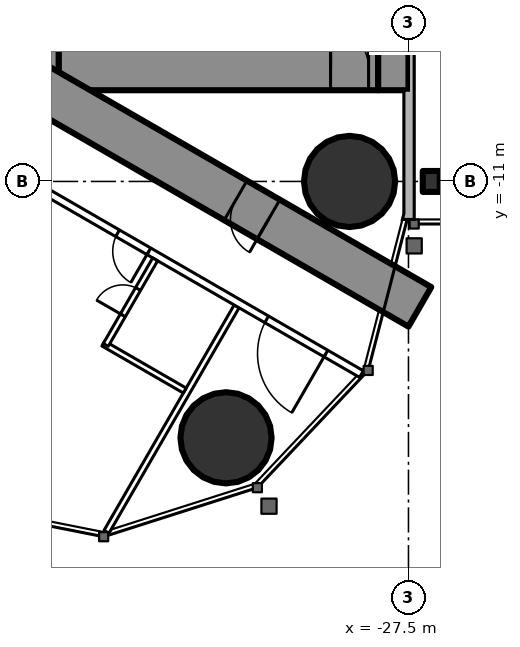
"""IFC4 building model, lengths in metres.
Left out: names, types, materials, properties, quantities, classifications, styles, units other than length and angle.
Written with IfcOpenShell. Run it as: python <this file> out.ifc"""

import sys

from ifc_helpers import new_model, si_unit, direction, frame, frame_2d, origin, origin_2d, place, context, subcontext, project, spatial, rectangle, circle, i_section, extrude, element, fill, save


model = new_model("IFC4")
c1 = context("Model", 3, precision=1e-05, world=origin(), true_north=direction((0.0, 1.0)))
c2 = subcontext(c1, "Body", "Model", "MODEL_VIEW")
j1 = project(units=[si_unit("LENGTHUNIT", "METRE"), si_unit("PLANEANGLEUNIT", "RADIAN")], contexts=[c1])
p1 = place(None, origin())
s1 = spatial("IfcSite", under=j1, at=p1, CompositionType="ELEMENT")
p2 = place(p1, origin())
s2 = spatial("IfcBuilding", under=s1, at=p2, CompositionType="ELEMENT")
p3 = place(p2, frame((0.0, 0.0, 236.9)))
s3 = spatial("IfcBuildingStorey", under=s2, at=p3, CompositionType="ELEMENT", Elevation=236.9)
for number, where, z_axis, x_axis in (
    (1, (-32.301, -17.745, 0.0), (0.0, 0.0, 1.0), (1.0, 0.0, 0.0)),
    (2, (-29.05, -11.0, 0.0), (0.0, 0.0, 1.0), (1.0, 0.0, 0.0)),
):
    element("IfcColumn", number, at=place(p3, frame(where, z_axis=z_axis, x_axis=x_axis)), inside=s3, PredefinedType="COLUMN", context=c2, shape_type="SweptSolid", body=[
        extrude(circle(Radius=1.2, at=origin_2d()), origin(), (0.0, 0.0, 1.0), 3.6),
    ])
p4 = place(p3, frame((-27.9, 8.6, 0.0), z_axis=(0.0, 0.0, 1.0), x_axis=(0.0, -1.0, 0.0)))
e3 = element("IfcWall", 3, at=p4, inside=s3, PredefinedType="SHEAR", context=c2, shape_type="SweptSolid", body=[
    extrude(rectangle(XDim=17.2, YDim=0.8, at=frame_2d((8.6, 0.0))), origin(), (0.0, 0.0, 1.0), 3.6),
])
p5 = place(p4, frame((6.95, 0.0, 0.0)))
e4 = element("IfcOpeningElement", 4, at=p5, cuts=e3, PredefinedType="OPENING", context=c2, shape_type="SweptSolid", body=[
    extrude(rectangle(XDim=0.9, YDim=2.2, at=frame_2d((0.45, 1.1))), frame((0.0, 0.41, 0.0), z_axis=(0.0, -1.0, 0.0), x_axis=(1.0, 0.0, 0.0)), (0.0, 0.0, 1.0), 0.82),
])
p6 = place(p3, frame((-37.3, 8.6, 0.0), z_axis=(0.0, 0.0, 1.0), x_axis=(0.0, -1.0, 0.0)))
e5 = element("IfcWall", 5, at=p6, inside=s3, PredefinedType="SHEAR", context=c2, shape_type="SweptSolid", body=[
    extrude(rectangle(XDim=17.2, YDim=1.2, at=frame_2d((8.6, 0.0))), origin(), (0.0, 0.0, 1.0), 3.6),
])
p7 = place(p6, frame((7.7, 0.0, 0.0)))
e6 = element("IfcOpeningElement", 6, at=p7, cuts=e5, PredefinedType="OPENING", context=c2, shape_type="SweptSolid", body=[
    extrude(rectangle(XDim=1.8, YDim=2.2, at=frame_2d((0.9, 1.1))), frame((0.0, 0.61, 0.0), z_axis=(0.0, -1.0, 0.0), x_axis=(1.0, 0.0, 0.0)), (0.0, 0.0, 1.0), 1.22),
])
p8 = place(p3, frame((-28.3, -8.0, 0.0), z_axis=(0.0, 0.0, 1.0), x_axis=(-1.0, 0.0, 0.0)))
e7 = element("IfcWall", 7, at=p8, inside=s3, PredefinedType="SHEAR", context=c2, shape_type="SweptSolid", body=[
    extrude(rectangle(XDim=8.4, YDim=1.2, at=frame_2d((4.2, 0.0))), origin(), (0.0, 0.0, 1.0), 3.6),
])
p9 = place(p8, frame((0.25, 0.0, 0.0)))
e8 = element("IfcOpeningElement", 8, at=p9, cuts=e7, PredefinedType="OPENING", context=c2, shape_type="SweptSolid", body=[
    extrude(rectangle(XDim=1.0, YDim=2.2, at=frame_2d((0.5, 1.1))), frame((0.0, 0.61, 0.0), z_axis=(0.0, -1.0, 0.0), x_axis=(1.0, 0.0, 0.0)), (0.0, 0.0, 1.0), 1.22),
])
p10 = place(p3, frame((-27.2, -14.3, 0.0), z_axis=(0.0, 0.0, 1.0), x_axis=(-0.866024021859, 0.500002393557, 0.0)))
e9 = element("IfcWall", 9, at=p10, inside=s3, PredefinedType="SHEAR", context=c2, shape_type="SweptSolid", body=[
    extrude(rectangle(XDim=27.907, YDim=1.2, at=frame_2d((13.954, 0.0))), origin(), (0.0, 0.0, 1.0), 3.6),
])
p11 = place(p10, frame((4.6, 0.0, 0.0)))
e10 = element("IfcOpeningElement", 10, at=p11, cuts=e9, PredefinedType="OPENING", context=c2, shape_type="SweptSolid", body=[
    extrude(rectangle(XDim=1.0, YDim=2.2, at=frame_2d((0.5, 1.1))), frame((0.0, 0.61, 0.0), z_axis=(0.0, -1.0, 0.0), x_axis=(1.0, 0.0, 0.0)), (0.0, 0.0, 1.0), 1.22),
])
p12 = place(p10, frame((13.395, 0.0, 0.0)))
e11 = element("IfcOpeningElement", 11, at=p12, cuts=e9, PredefinedType="OPENING", context=c2, shape_type="SweptSolid", body=[
    extrude(rectangle(XDim=1.8, YDim=2.2, at=frame_2d((0.9, 1.1))), frame((0.0, 0.61, 0.0), z_axis=(0.0, -1.0, 0.0), x_axis=(1.0, 0.0, 0.0)), (0.0, 0.0, 1.0), 1.22),
])
p13 = place(p3, frame((-26.9, -11.0, 0.0), z_axis=(0.0, 0.0, 1.0), x_axis=(1.0, 0.0, 0.0)))
e12 = element("IfcColumn", 12, at=p13, inside=s3, PredefinedType="COLUMN", context=c2, shape_type="SweptSolid", body=[
    extrude(i_section(OverallWidth=0.448, OverallDepth=0.55, WebThickness=0.072, FlangeThickness=0.115, FilletRadius=0.02, at=origin_2d()), origin(), (0.0, 0.0, 1.0), 3.6),
])
p14 = place(p3, frame((-32.022, -14.287, 0.0), z_axis=(0.0, 0.0, 1.0), x_axis=(-0.50000019414, -0.866025291697, 0.0)))
e13 = element("IfcWall", 13, at=p14, inside=s3, PredefinedType="PARTITIONING", context=c2, shape_type="SweptSolid", body=[
    extrude(rectangle(XDim=6.848, YDim=0.15, at=frame_2d((3.424, 0.0))), origin(), (0.0, 0.0, 1.0), 3.35),
])
p15 = place(p3, frame((-28.737, -16.068, 0.0), z_axis=(0.0, 0.0, 1.0), x_axis=(-0.866029399323, 0.49999307946, 0.0)))
e14 = element("IfcWall", 14, at=p15, inside=s3, PredefinedType="PARTITIONING", context=c2, shape_type="SweptSolid", body=[
    extrude(rectangle(XDim=11.61, YDim=0.2, at=frame_2d((5.805, 0.0))), origin(), (0.0, 0.0, 1.0), 3.35),
])
p16 = place(p15, frame((1.08, 0.0, 0.0)))
e15 = element("IfcOpeningElement", 15, at=p16, cuts=e14, PredefinedType="OPENING", context=c2, shape_type="SweptSolid", body=[
    extrude(rectangle(XDim=1.8, YDim=2.03, at=frame_2d((0.9, 1.015))), frame((0.0, 0.11, 0.0), z_axis=(0.0, -1.0, 0.0), x_axis=(1.0, 0.0, 0.0)), (0.0, 0.0, 1.0), 0.22),
])
p17 = place(p15, frame((6.46, 0.0, 0.0)))
e16 = element("IfcOpeningElement", 16, at=p17, cuts=e14, PredefinedType="OPENING", context=c2, shape_type="SweptSolid", body=[
    extrude(rectangle(XDim=0.95, YDim=2.2, at=frame_2d((0.475, 1.1))), frame((0.0, 0.11, 0.0), z_axis=(0.0, -1.0, 0.0), x_axis=(1.0, 0.0, 0.0)), (0.0, 0.0, 1.0), 0.22),
])
p18 = place(p3, frame((-33.387, -16.502, 0.0), z_axis=(0.0, 0.0, 1.0), x_axis=(-0.866006523861, 0.500032699561, 0.0)))
e17 = element("IfcWall", 17, at=p18, inside=s3, PredefinedType="PARTITIONING", context=c2, shape_type="SweptSolid", body=[
    extrude(rectangle(XDim=2.475, YDim=0.15, at=frame_2d((1.237, 0.0))), origin(), (0.0, 0.0, 1.0), 3.35),
])
p19 = place(p3, frame((-34.165, -13.05, 0.0), z_axis=(0.0, 0.0, 1.0), x_axis=(-0.500047596559, -0.865997922154, 0.0)))
e18 = element("IfcWall", 18, at=p19, inside=s3, PredefinedType="PARTITIONING", context=c2, shape_type="SweptSolid", body=[
    extrude(rectangle(XDim=2.6, YDim=0.15, at=frame_2d((1.3, 0.0))), origin(), (0.0, 0.0, 1.0), 3.35),
])
p20 = place(p19, frame((0.9, 0.0, 0.0)))
e19 = element("IfcOpeningElement", 19, at=p20, cuts=e18, PredefinedType="OPENING", context=c2, shape_type="SweptSolid", body=[
    extrude(rectangle(XDim=0.8, YDim=2.2, at=frame_2d((0.4, 1.1))), frame((0.0, 0.085, 0.0), z_axis=(0.0, -1.0, 0.0), x_axis=(1.0, 0.0, 0.0)), (0.0, 0.0, 1.0), 0.17),
])
p21 = place(p16, origin())
e20 = element("IfcDoor", 20, at=p21, inside=s3, OperationType="DOUBLE_DOOR_SINGLE_SWING", PredefinedType="DOOR", context=c2, shape_type="SweptSolid", body=[
    extrude(rectangle(XDim=1.8, YDim=2.03, at=frame_2d((0.9, 1.015))), frame((0.0, 0.025, 0.0), z_axis=(0.0, -1.0, 0.0), x_axis=(1.0, 0.0, 0.0)), (0.0, 0.0, 1.0), 0.05),
])
fill(e15, e20)
p22 = place(p20, origin())
e21 = element("IfcDoor", 21, at=p22, inside=s3, OperationType="SINGLE_SWING_RIGHT", PredefinedType="DOOR", context=c2, shape_type="SweptSolid", body=[
    extrude(rectangle(XDim=0.8, YDim=2.2, at=frame_2d((0.4, 1.1))), frame((0.0, 0.025, 0.0), z_axis=(0.0, -1.0, 0.0), x_axis=(1.0, 0.0, 0.0)), (0.0, 0.0, 1.0), 0.05),
])
fill(e19, e21)
p23 = place(p17, origin())
e22 = element("IfcDoor", 22, at=p23, inside=s3, OperationType="SINGLE_SWING_LEFT", PredefinedType="DOOR", context=c2, shape_type="SweptSolid", body=[
    extrude(rectangle(XDim=0.95, YDim=2.2, at=frame_2d((0.475, 1.1))), frame((0.0, 0.025, 0.0), z_axis=(0.0, -1.0, 0.0), x_axis=(1.0, 0.0, 0.0)), (0.0, 0.0, 1.0), 0.05),
])
fill(e16, e22)
p24 = place(p11, origin())
e23 = element("IfcDoor", 23, at=p24, inside=s3, OperationType="SINGLE_SWING_LEFT", PredefinedType="DOOR", context=c2, shape_type="SweptSolid", body=[
    extrude(rectangle(XDim=1.0, YDim=2.2, at=frame_2d((0.5, 1.1))), frame((0.0, 0.025, 0.0), z_axis=(0.0, -1.0, 0.0), x_axis=(1.0, 0.0, 0.0)), (0.0, 0.0, 1.0), 0.05),
])
fill(e10, e23)
p25 = place(p9, origin())
e24 = element("IfcDoor", 24, at=p25, inside=s3, OperationType="SINGLE_SWING_RIGHT", PredefinedType="DOOR", context=c2, shape_type="SweptSolid", body=[
    extrude(rectangle(XDim=1.0, YDim=2.2, at=frame_2d((0.5, 1.1))), frame((0.0, 0.025, 0.0), z_axis=(0.0, -1.0, 0.0), x_axis=(1.0, 0.0, 0.0)), (0.0, 0.0, 1.0), 0.05),
])
fill(e8, e24)
save(model, sys.argv[1])
